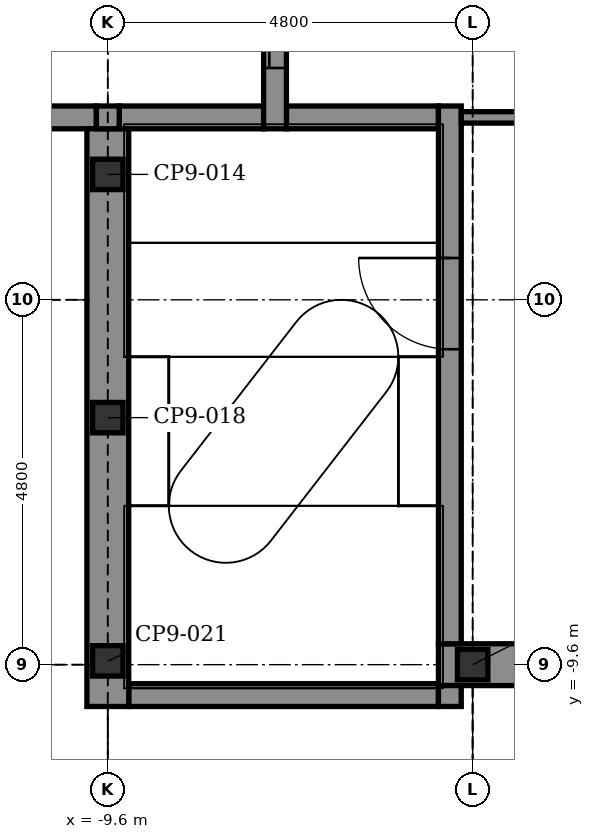
"""IFC4 building model, lengths in metres.
Left out: names, types, materials, properties, quantities, classifications, styles, units other than length and angle.
Written with IfcOpenShell. Run it as: python <this file> out.ifc"""

import sys

from ifc_helpers import new_model, si_unit, direction, frame, frame_2d, origin, origin_2d, place, context, subcontext, project, spatial, polyline, rectangle, hollow_rectangle, outline, extrude, element, fill, save


model = new_model("IFC4")
c1 = context("Model", 3, precision=1e-05, world=origin(), true_north=direction((0.0, 1.0)))
c2 = subcontext(c1, "Body", "Model", "MODEL_VIEW")
j1 = project(units=[si_unit("LENGTHUNIT", "METRE"), si_unit("PLANEANGLEUNIT", "RADIAN")], contexts=[c1])
p1 = place(None, origin())
s1 = spatial("IfcSite", under=j1, at=p1, CompositionType="ELEMENT")
p2 = place(p1, origin())
s2 = spatial("IfcBuilding", under=s1, at=p2, CompositionType="ELEMENT")
p3 = place(p2, frame((0.0, 0.0, 301.9)))
s3 = spatial("IfcBuildingStorey", under=s2, at=p3, CompositionType="ELEMENT", Elevation=301.9)
p4 = place(p3, frame((-9.325, -10.0, -0.3), z_axis=(0.0, 0.0, 1.0), x_axis=(1.0, 0.0, 0.0)))
e1 = element("IfcWall", 1, at=p4, inside=s3, PredefinedType="STANDARD", context=c2, shape_type="SweptSolid", body=[
    extrude(rectangle(XDim=4.075, YDim=0.3, at=frame_2d((2.038, 0.0))), origin(), (0.0, 0.0, 1.0), 5.3),
])
p5 = place(p3, frame((-5.25, -9.6, -0.3), z_axis=(0.0, 0.0, 1.0), x_axis=(1.0, 0.0, 0.0)))
e2 = element("IfcWall", 2, at=p5, inside=s3, PredefinedType="SHEAR", context=c2, shape_type="SweptSolid", body=[
    extrude(rectangle(XDim=10.2, YDim=0.55, at=frame_2d((5.1, 0.0))), origin(), (0.0, 0.0, 1.0), 5.3),
])
p6 = place(p5, frame((9.0, 0.0, 0.3)))
e3 = element("IfcOpeningElement", 3, at=p6, cuts=e2, PredefinedType="OPENING", context=c2, shape_type="SweptSolid", body=[
    extrude(rectangle(XDim=0.9, YDim=2.1, at=frame_2d((0.45, 1.05))), frame((0.0, 0.285, 0.0), z_axis=(0.0, -1.0, 0.0), x_axis=(1.0, 0.0, 0.0)), (0.0, 0.0, 1.0), 0.57),
])
p7 = place(p3, frame((-10.85, -2.4, -0.3), z_axis=(0.0, 0.0, 1.0), x_axis=(1.0, 0.0, 0.0)))
e4 = element("IfcWall", 4, at=p7, inside=s3, PredefinedType="STANDARD", context=c2, shape_type="SweptSolid", body=[
    extrude(rectangle(XDim=1.1, YDim=0.3, at=frame_2d((0.55, 0.0))), origin(), (0.0, 0.0, 1.0), 4.7),
])
p8 = place(p3, frame((-9.45, -2.4, -0.3), z_axis=(0.0, 0.0, 1.0), x_axis=(1.0, 0.0, 0.0)))
e5 = element("IfcWall", 5, at=p8, inside=s3, PredefinedType="STANDARD", context=c2, shape_type="SweptSolid", body=[
    extrude(rectangle(XDim=1.9, YDim=0.3, at=frame_2d((0.95, 0.0))), origin(), (0.0, 0.0, 1.0), 5.3),
])
p9 = place(p3, frame((-7.25, -2.4, -0.3), z_axis=(0.0, 0.0, 1.0), x_axis=(1.0, 0.0, 0.0)))
e6 = element("IfcWall", 6, at=p9, inside=s3, PredefinedType="STANDARD", context=c2, shape_type="SweptSolid", body=[
    extrude(rectangle(XDim=2.0, YDim=0.3, at=frame_2d((1.0, 0.0))), origin(), (0.0, 0.0, 1.0), 5.3),
])
p10 = place(p3, frame((-9.6, -10.15, -0.3), z_axis=(0.0, 0.0, 1.0), x_axis=(0.0, 1.0, 0.0)))
e7 = element("IfcWall", 7, at=p10, inside=s3, PredefinedType="SHEAR", context=c2, shape_type="SweptSolid", body=[
    extrude(rectangle(XDim=7.6, YDim=0.55, at=frame_2d((3.8, 0.0))), origin(), (0.0, 0.0, 1.0), 5.3),
])
p11 = place(p3, frame((-9.6, -2.55, -0.3), z_axis=(0.0, 0.0, 1.0), x_axis=(0.0, 1.0, 0.0)))
e8 = element("IfcWall", 8, at=p11, inside=s3, PredefinedType="STANDARD", context=c2, shape_type="SweptSolid", body=[
    extrude(rectangle(XDim=0.3, YDim=0.3, at=frame_2d((0.15, 0.0))), origin(), (0.0, 0.0, 1.0), 5.3),
])
p12 = place(p3, frame((-7.4, -2.55, -0.3), z_axis=(0.0, 0.0, 1.0), x_axis=(0.0, 1.0, 0.0)))
e9 = element("IfcWall", 9, at=p12, inside=s3, PredefinedType="STANDARD", context=c2, shape_type="SweptSolid", body=[
    extrude(rectangle(XDim=5.1, YDim=0.3, at=frame_2d((2.55, 0.0))), origin(), (0.0, 0.0, 1.0), 4.7),
])
p13 = place(p12, frame((0.8, 0.0, 0.3)))
e10 = element("IfcOpeningElement", 10, at=p13, cuts=e9, PredefinedType="OPENING", context=c2, shape_type="SweptSolid", body=[
    extrude(rectangle(XDim=1.1, YDim=2.1, at=frame_2d((0.55, 1.05))), frame((0.0, 0.16, 0.0), z_axis=(0.0, -1.0, 0.0), x_axis=(1.0, 0.0, 0.0)), (0.0, 0.0, 1.0), 0.32),
])
p14 = place(p12, frame((3.2, 0.0, 0.3)))
e11 = element("IfcOpeningElement", 11, at=p14, cuts=e9, PredefinedType="OPENING", context=c2, shape_type="SweptSolid", body=[
    extrude(rectangle(XDim=1.1, YDim=2.1, at=frame_2d((0.55, 1.05))), frame((0.0, 0.16, 0.0), z_axis=(0.0, -1.0, 0.0), x_axis=(1.0, 0.0, 0.0)), (0.0, 0.0, 1.0), 0.32),
])
p15 = place(p3, frame((-5.1, -10.15, -0.3), z_axis=(0.0, 0.0, 1.0), x_axis=(0.0, 1.0, 0.0)))
e12 = element("IfcWall", 12, at=p15, inside=s3, PredefinedType="STANDARD", context=c2, shape_type="SweptSolid", body=[
    extrude(rectangle(XDim=0.275, YDim=0.3, at=frame_2d((0.137, 0.0))), origin(), (0.0, 0.0, 1.0), 5.3),
])
p16 = place(p3, frame((-5.1, -9.325, -0.3), z_axis=(0.0, 0.0, 1.0), x_axis=(0.0, 1.0, 0.0)))
e13 = element("IfcWall", 13, at=p16, inside=s3, PredefinedType="STANDARD", context=c2, shape_type="SweptSolid", body=[
    extrude(rectangle(XDim=7.075, YDim=0.3, at=frame_2d((3.538, 0.0))), origin(), (0.0, 0.0, 1.0), 5.3),
])
p17 = place(p16, frame((3.875, 0.0, 0.3)))
e14 = element("IfcOpeningElement", 14, at=p17, cuts=e13, PredefinedType="OPENING", context=c2, shape_type="SweptSolid", body=[
    extrude(rectangle(XDim=1.2, YDim=2.1, at=frame_2d((0.6, 1.05))), frame((0.0, 0.16, 0.0), z_axis=(0.0, -1.0, 0.0), x_axis=(1.0, 0.0, 0.0)), (0.0, 0.0, 1.0), 0.32),
])
p18 = place(p3, frame((-9.6, -9.55, 5.0), z_axis=(0.0, 0.0, 1.0), x_axis=(1.0, 0.0, 0.0)))
e15 = element("IfcColumn", 15, at=p18, inside=s3, PredefinedType="COLUMN", context=c2, shape_type="SweptSolid", body=[
    extrude(hollow_rectangle(XDim=0.4, YDim=0.4, WallThickness=0.02, at=origin_2d()), origin(), (0.0, 0.0, 1.0), 3.774),
])
p19 = place(p3, frame((-9.6, -6.35, 5.0), z_axis=(0.0, 0.0, 1.0), x_axis=(1.0, 0.0, 0.0)))
e16 = element("IfcColumn", 16, at=p19, inside=s3, PredefinedType="COLUMN", context=c2, shape_type="SweptSolid", body=[
    extrude(hollow_rectangle(XDim=0.4, YDim=0.4, WallThickness=0.02, at=origin_2d()), origin(), (0.0, 0.0, 1.0), 5.774),
])
p20 = place(p3, frame((-9.6, -3.15, 5.0), z_axis=(0.0, 0.0, 1.0), x_axis=(1.0, 0.0, 0.0)))
e17 = element("IfcColumn", 17, at=p20, inside=s3, PredefinedType="COLUMN", context=c2, shape_type="SweptSolid", body=[
    extrude(hollow_rectangle(XDim=0.4, YDim=0.4, WallThickness=0.02, at=origin_2d()), origin(), (0.0, 0.0, 1.0), 7.773),
])
p21 = place(p3, frame((-4.8, -9.6, 5.0), z_axis=(0.0, 0.0, 1.0), x_axis=(1.0, 0.0, 0.0)))
e18 = element("IfcColumn", 18, at=p21, inside=s3, PredefinedType="COLUMN", context=c2, shape_type="SweptSolid", body=[
    extrude(hollow_rectangle(XDim=0.4, YDim=0.4, WallThickness=0.02, at=origin_2d()), origin(), (0.0, 0.0, 1.0), 2.917),
])
p22 = place(p3, frame((-10.358, -15.065, 0.0), z_axis=(0.0, 0.0, 1.0), x_axis=(-0.500010301671, 0.86601945603, 0.0)))
e19 = element("IfcWall", 19, at=p22, inside=s3, PredefinedType="SOLIDWALL", context=c2, shape_type="SweptSolid", body=[
    extrude(outline(polyline([(0.0, 0.0), (15.736, 0.0), (15.736, 14.197), (0.0, 5.682), (0.0, 0.0)])), frame((0.0, 0.125, 0.0), z_axis=(0.0, -1.0, 0.0), x_axis=(1.0, 0.0, 0.0)), (0.0, 0.0, 1.0), 0.25),
])
p23 = place(p22, frame((9.068, 0.0, 5.8)))
e20 = element("IfcOpeningElement", 20, at=p23, cuts=e19, PredefinedType="OPENING", context=c2, shape_type="SweptSolid", body=[
    extrude(rectangle(XDim=2.4, YDim=3.6, at=frame_2d((1.2, 1.8))), frame((0.0, 0.135, 0.0), z_axis=(0.0, -1.0, 0.0), x_axis=(1.0, 0.0, 0.0)), (0.0, 0.0, 1.0), 0.27),
])
p24 = place(p22, frame((9.068, 0.0, 1.0)))
e21 = element("IfcOpeningElement", 21, at=p24, cuts=e19, PredefinedType="OPENING", context=c2, shape_type="SweptSolid", body=[
    extrude(rectangle(XDim=2.4, YDim=3.0, at=frame_2d((1.2, 1.5))), frame((0.0, 0.135, 0.0), z_axis=(0.0, -1.0, 0.0), x_axis=(1.0, 0.0, 0.0)), (0.0, 0.0, 1.0), 0.27),
])
p25 = place(p3, frame((-4.95, -2.4, 0.0), z_axis=(0.0, 0.0, 1.0), x_axis=(1.0, 0.0, 0.0)))
e22 = element("IfcWall", 22, at=p25, inside=s3, PredefinedType="PARTITIONING", context=c2, shape_type="SweptSolid", body=[
    extrude(rectangle(XDim=1.2, YDim=0.15, at=frame_2d((0.6, 0.0))), origin(), (0.0, 0.0, 1.0), 5.0),
])
p26 = place(p13, origin())
e23 = element("IfcDoor", 23, at=p26, inside=s3, OperationType="DOUBLE_DOOR_SLIDING", PredefinedType="DOOR", context=c2, shape_type="SweptSolid", body=[
    extrude(rectangle(XDim=1.1, YDim=2.1, at=frame_2d((0.55, 1.05))), frame((0.0, 0.025, 0.0), z_axis=(0.0, -1.0, 0.0), x_axis=(1.0, 0.0, 0.0)), (0.0, 0.0, 1.0), 0.05),
])
fill(e10, e23)
p27 = place(p17, origin())
e24 = element("IfcDoor", 24, at=p27, inside=s3, OperationType="SINGLE_SWING_RIGHT", PredefinedType="DOOR", context=c2, shape_type="SweptSolid", body=[
    extrude(rectangle(XDim=1.2, YDim=2.1, at=frame_2d((0.6, 1.05))), frame((0.0, 0.025, 0.0), z_axis=(0.0, -1.0, 0.0), x_axis=(1.0, 0.0, 0.0)), (0.0, 0.0, 1.0), 0.05),
])
fill(e14, e24)
save(model, sys.argv[1])
